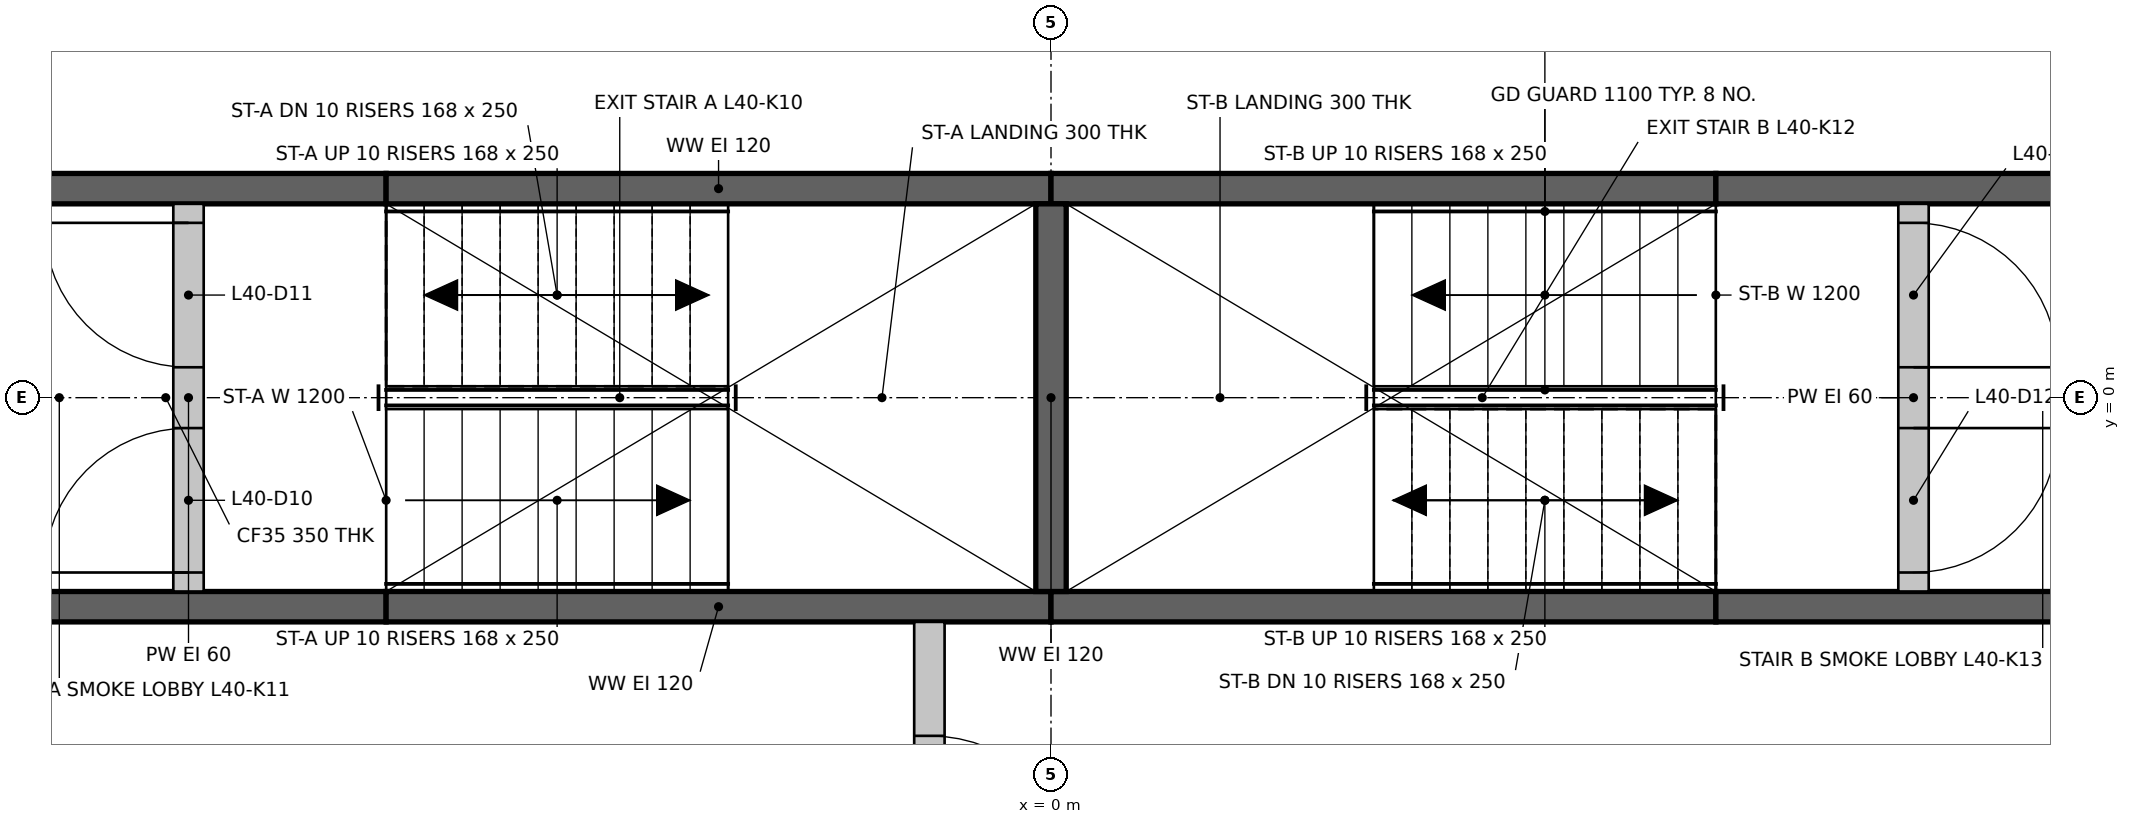
"""IFC4 building model, lengths in metres.
Left out: names, types, materials, properties, quantities, classifications, styles, units other than length and angle.
Written with IfcOpenShell. Run it as: python <this file> out.ifc"""

import sys

from ifc_helpers import new_model, si_unit, direction, frame, frame_2d, origin, place, context, subcontext, project, spatial, rectangle, extrude, element, fill, save


model = new_model("IFC4")
c1 = context("Model", 3, precision=1e-05, world=origin(), true_north=direction((0.0, 1.0)))
c2 = subcontext(c1, "Body", "Model", "MODEL_VIEW")
j1 = project(units=[si_unit("LENGTHUNIT", "METRE"), si_unit("PLANEANGLEUNIT", "RADIAN")], contexts=[c1])
p1 = place(None, origin())
s1 = spatial("IfcSite", under=j1, at=p1, CompositionType="ELEMENT")
p2 = place(p1, origin())
s2 = spatial("IfcBuilding", under=s1, at=p2, CompositionType="ELEMENT")
p3 = place(p2, frame((0.0, 0.0, 157.8)))
s3 = spatial("IfcBuildingStorey", under=s2, at=p3, CompositionType="ELEMENT", Elevation=157.8)
p4 = place(p3, frame((-7.274, -1.375, 0.0), z_axis=(0.0, 0.0, 1.0), x_axis=(1.0, 0.0, 0.0)))
e1 = element("IfcWall", 1, at=p4, inside=s3, PredefinedType="SHEAR", context=c2, shape_type="SweptSolid", body=[
    extrude(rectangle(XDim=2.9, YDim=0.2, at=frame_2d((1.45, 0.0))), origin(), (0.0, 0.0, 1.0), 3.0),
])
for number, where, z_axis, x_axis in (
    (2, (-4.374, -1.375, 0.0), (0.0, 0.0, 1.0), (1.0, 0.0, 0.0)),
    (3, (0.0, -1.375, 0.0), (0.0, 0.0, 1.0), (1.0, 0.0, 0.0)),
):
    element("IfcWall", number, at=place(p3, frame(where, z_axis=z_axis, x_axis=x_axis)), inside=s3, PredefinedType="SHEAR", context=c2, shape_type="SweptSolid", body=[
        extrude(rectangle(XDim=4.374, YDim=0.2, at=frame_2d((2.187, 0.0))), origin(), (0.0, 0.0, 1.0), 3.0),
    ])
for number, where, z_axis, x_axis in (
    (4, (4.374, -1.375, 0.0), (0.0, 0.0, 1.0), (1.0, 0.0, 0.0)),
    (5, (-7.274, 1.375, 0.0), (0.0, 0.0, 1.0), (1.0, 0.0, 0.0)),
):
    element("IfcWall", number, at=place(p3, frame(where, z_axis=z_axis, x_axis=x_axis)), inside=s3, PredefinedType="SHEAR", context=c2, shape_type="SweptSolid", body=[
        extrude(rectangle(XDim=2.9, YDim=0.2, at=frame_2d((1.45, 0.0))), origin(), (0.0, 0.0, 1.0), 3.0),
    ])
for number, where, z_axis, x_axis in (
    (6, (-4.374, 1.375, 0.0), (0.0, 0.0, 1.0), (1.0, 0.0, 0.0)),
    (7, (0.0, 1.375, 0.0), (0.0, 0.0, 1.0), (1.0, 0.0, 0.0)),
):
    element("IfcWall", number, at=place(p3, frame(where, z_axis=z_axis, x_axis=x_axis)), inside=s3, PredefinedType="SHEAR", context=c2, shape_type="SweptSolid", body=[
        extrude(rectangle(XDim=4.374, YDim=0.2, at=frame_2d((2.187, 0.0))), origin(), (0.0, 0.0, 1.0), 3.0),
    ])
p5 = place(p3, frame((4.374, 1.375, 0.0), z_axis=(0.0, 0.0, 1.0), x_axis=(1.0, 0.0, 0.0)))
e8 = element("IfcWall", 8, at=p5, inside=s3, PredefinedType="SHEAR", context=c2, shape_type="SweptSolid", body=[
    extrude(rectangle(XDim=2.9, YDim=0.2, at=frame_2d((1.45, 0.0))), origin(), (0.0, 0.0, 1.0), 3.0),
])
p6 = place(p3, frame((0.0, -1.275, 0.0), z_axis=(0.0, 0.0, 1.0), x_axis=(0.0, 1.0, 0.0)))
e9 = element("IfcWall", 9, at=p6, inside=s3, PredefinedType="SHEAR", context=c2, shape_type="SweptSolid", body=[
    extrude(rectangle(XDim=2.55, YDim=0.2, at=frame_2d((1.275, 0.0))), origin(), (0.0, 0.0, 1.0), 3.0),
])
p7 = place(p3, frame((-0.8, -3.974, 0.0), z_axis=(0.0, 0.0, 1.0), x_axis=(0.0, 1.0, 0.0)))
e10 = element("IfcWall", 10, at=p7, inside=s3, PredefinedType="PARTITIONING", context=c2, shape_type="SweptSolid", body=[
    extrude(rectangle(XDim=2.499, YDim=0.2, at=frame_2d((1.25, 0.0))), origin(), (0.0, 0.0, 1.0), 3.0),
])
p8 = place(p7, frame((0.75, 0.0, 0.0)))
e11 = element("IfcOpeningElement", 11, at=p8, cuts=e10, PredefinedType="OPENING", context=c2, shape_type="SweptSolid", body=[
    extrude(rectangle(XDim=1.0, YDim=2.1, at=frame_2d((0.5, 1.05))), frame((0.0, 0.11, 0.0), z_axis=(0.0, -1.0, 0.0), x_axis=(1.0, 0.0, 0.0)), (0.0, 0.0, 1.0), 0.22),
])
p9 = place(p3, frame((-5.674, -1.275, 0.0), z_axis=(0.0, 0.0, 1.0), x_axis=(0.0, 1.0, 0.0)))
e12 = element("IfcWall", 12, at=p9, inside=s3, PredefinedType="PARTITIONING", context=c2, shape_type="SweptSolid", body=[
    extrude(rectangle(XDim=2.55, YDim=0.2, at=frame_2d((1.275, 0.0))), origin(), (0.0, 0.0, 1.0), 3.0),
])
p10 = place(p9, frame((0.125, 0.0, 0.0)))
e13 = element("IfcOpeningElement", 13, at=p10, cuts=e12, PredefinedType="OPENING", context=c2, shape_type="SweptSolid", body=[
    extrude(rectangle(XDim=0.95, YDim=2.1, at=frame_2d((0.475, 1.05))), frame((0.0, 0.11, 0.0), z_axis=(0.0, -1.0, 0.0), x_axis=(1.0, 0.0, 0.0)), (0.0, 0.0, 1.0), 0.22),
])
p11 = place(p9, frame((1.475, 0.0, 0.0)))
e14 = element("IfcOpeningElement", 14, at=p11, cuts=e12, PredefinedType="OPENING", context=c2, shape_type="SweptSolid", body=[
    extrude(rectangle(XDim=0.95, YDim=2.1, at=frame_2d((0.475, 1.05))), frame((0.0, 0.11, 0.0), z_axis=(0.0, -1.0, 0.0), x_axis=(1.0, 0.0, 0.0)), (0.0, 0.0, 1.0), 0.22),
])
p12 = place(p3, frame((5.674, -1.275, 0.0), z_axis=(0.0, 0.0, 1.0), x_axis=(0.0, 1.0, 0.0)))
e15 = element("IfcWall", 15, at=p12, inside=s3, PredefinedType="PARTITIONING", context=c2, shape_type="SweptSolid", body=[
    extrude(rectangle(XDim=2.55, YDim=0.2, at=frame_2d((1.275, 0.0))), origin(), (0.0, 0.0, 1.0), 3.0),
])
p13 = place(p12, frame((0.125, 0.0, 0.0)))
e16 = element("IfcOpeningElement", 16, at=p13, cuts=e15, PredefinedType="OPENING", context=c2, shape_type="SweptSolid", body=[
    extrude(rectangle(XDim=0.95, YDim=2.1, at=frame_2d((0.475, 1.05))), frame((0.0, 0.11, 0.0), z_axis=(0.0, -1.0, 0.0), x_axis=(1.0, 0.0, 0.0)), (0.0, 0.0, 1.0), 0.22),
])
p14 = place(p12, frame((1.475, 0.0, 0.0)))
e17 = element("IfcOpeningElement", 17, at=p14, cuts=e15, PredefinedType="OPENING", context=c2, shape_type="SweptSolid", body=[
    extrude(rectangle(XDim=0.95, YDim=2.1, at=frame_2d((0.475, 1.05))), frame((0.0, 0.11, 0.0), z_axis=(0.0, -1.0, 0.0), x_axis=(1.0, 0.0, 0.0)), (0.0, 0.0, 1.0), 0.22),
])
p15 = place(p10, origin())
e18 = element("IfcDoor", 18, at=p15, inside=s3, OperationType="SINGLE_SWING_LEFT", PredefinedType="DOOR", context=c2, shape_type="SweptSolid", body=[
    extrude(rectangle(XDim=0.95, YDim=2.1, at=frame_2d((0.475, 1.05))), frame((0.0, 0.025, 0.0), z_axis=(0.0, -1.0, 0.0), x_axis=(1.0, 0.0, 0.0)), (0.0, 0.0, 1.0), 0.05),
])
fill(e13, e18)
p16 = place(p11, origin())
e19 = element("IfcDoor", 19, at=p16, inside=s3, OperationType="SINGLE_SWING_RIGHT", PredefinedType="DOOR", context=c2, shape_type="SweptSolid", body=[
    extrude(rectangle(XDim=0.95, YDim=2.1, at=frame_2d((0.475, 1.05))), frame((0.0, 0.025, 0.0), z_axis=(0.0, -1.0, 0.0), x_axis=(1.0, 0.0, 0.0)), (0.0, 0.0, 1.0), 0.05),
])
fill(e14, e19)
p17 = place(p13, frame((0.95, 0.0, 0.0), z_axis=(0.0, 0.0, 1.0), x_axis=(-1.0, 0.0, 0.0)))
e20 = element("IfcDoor", 20, at=p17, inside=s3, OperationType="SINGLE_SWING_RIGHT", PredefinedType="DOOR", context=c2, shape_type="SweptSolid", body=[
    extrude(rectangle(XDim=0.95, YDim=2.1, at=frame_2d((0.475, 1.05))), frame((0.0, 0.025, 0.0), z_axis=(0.0, -1.0, 0.0), x_axis=(1.0, 0.0, 0.0)), (0.0, 0.0, 1.0), 0.05),
])
fill(e16, e20)
p18 = place(p14, frame((0.95, 0.0, 0.0), z_axis=(0.0, 0.0, 1.0), x_axis=(-1.0, 0.0, 0.0)))
e21 = element("IfcDoor", 21, at=p18, inside=s3, OperationType="SINGLE_SWING_LEFT", PredefinedType="DOOR", context=c2, shape_type="SweptSolid", body=[
    extrude(rectangle(XDim=0.95, YDim=2.1, at=frame_2d((0.475, 1.05))), frame((0.0, 0.025, 0.0), z_axis=(0.0, -1.0, 0.0), x_axis=(1.0, 0.0, 0.0)), (0.0, 0.0, 1.0), 0.05),
])
fill(e17, e21)
p19 = place(p8, frame((1.0, 0.0, 0.0), z_axis=(0.0, 0.0, 1.0), x_axis=(-1.0, 0.0, 0.0)))
e22 = element("IfcDoor", 22, at=p19, inside=s3, OperationType="SINGLE_SWING_LEFT", PredefinedType="DOOR", context=c2, shape_type="SweptSolid", body=[
    extrude(rectangle(XDim=1.0, YDim=2.1, at=frame_2d((0.5, 1.05))), frame((0.0, 0.025, 0.0), z_axis=(0.0, -1.0, 0.0), x_axis=(1.0, 0.0, 0.0)), (0.0, 0.0, 1.0), 0.05),
])
fill(e11, e22)
save(model, sys.argv[1])
